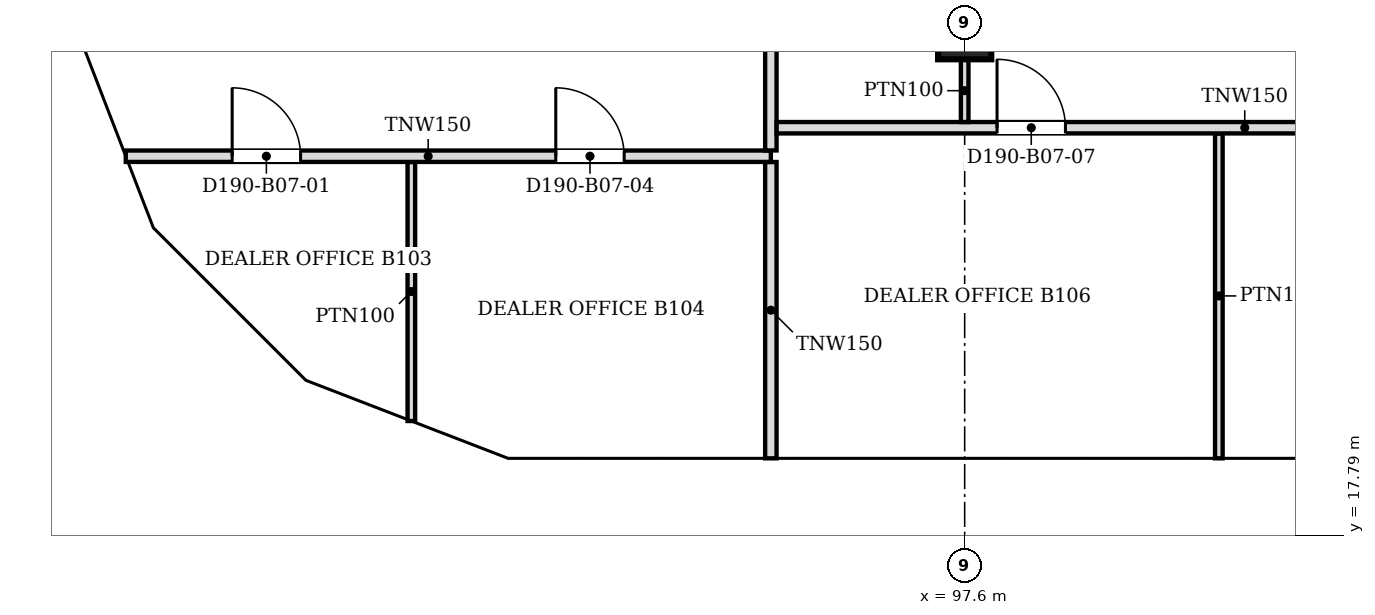
"""IFC4 building model, lengths in metres.
Left out: names, types, materials, properties, quantities, classifications, styles, units other than length and angle.
Written with IfcOpenShell. Run it as: python <this file> out.ifc"""

import sys

from ifc_helpers import new_model, si_unit, direction, frame, frame_2d, origin, origin_2d, place, context, subcontext, project, spatial, polyline, rectangle, outline, extrude, faceted_brep, source, transform, mapped, element, fill, save


model = new_model("IFC4")
c1 = context("Model", 3, precision=1e-05, world=origin(), true_north=direction((0.0, 1.0)))
c2 = subcontext(c1, "Body", "Model", "MODEL_VIEW")
j1 = project(units=[si_unit("LENGTHUNIT", "METRE"), si_unit("PLANEANGLEUNIT", "RADIAN")], contexts=[c1])
p1 = place(None, origin())
s1 = spatial("IfcSite", under=j1, at=p1, CompositionType="ELEMENT")
p2 = place(p1, origin())
s2 = spatial("IfcBuilding", under=s1, at=p2, CompositionType="ELEMENT")
p3 = place(p2, frame((0.0, 0.0, 72.4)))
s3 = spatial("IfcBuildingStorey", under=s2, at=p3, CompositionType="ELEMENT", Elevation=72.4)
p4 = place(p3, frame((97.6, 24.4, 0.0), z_axis=(0.0, 0.0, 1.0), x_axis=(1.0, 0.0, 0.0)))
e1 = element("IfcColumn", 1, at=p4, inside=s3, PredefinedType="COLUMN", context=c2, shape_type="SweptSolid", body=[
    extrude(rectangle(XDim=0.7, YDim=0.7, at=origin_2d()), origin(), (0.0, 0.0, 1.0), 3.6),
])
m1 = source(origin(), c2, "Body", "Brep", [
    faceted_brep([(3.003, -0.25, 0.0), (6.053, -0.25, 3.8), (3.003, -0.25, 7.6), (0.0, -0.25, 3.8), (0.047, 0.25, 3.859), (3.003, 0.25, 7.6), (6.053, 0.25, 3.8), (3.003, 0.25, 0.0), (0.047, 0.25, 3.741), (0.0, 0.0, 3.8)], [[[0, 1, 2, 3]], [[4, 5, 6, 7, 8]], [[7, 6, 1, 0]], [[6, 5, 2, 1]], [[5, 4, 9, 3, 2]], [[8, 7, 0, 3, 9]], [[8, 9, 4]]]),
])
p5 = place(p3, frame((91.547, 18.55, -3.8), z_axis=(0.0, 0.0, 1.0), x_axis=(1.0, 0.0, 0.0)))
e2 = element("IfcWall", 2, at=p5, inside=s3, PredefinedType="SOLIDWALL", context=c2, shape_type="MappedRepresentation", body=[
    mapped(m1, transform((0.0, 0.0, 0.0), scale=1.0)),
])
m2 = source(origin(), c2, "Body", "SweptSolid", [
    extrude(outline(polyline([(3.005, 0.401), (5.733, 3.8), (3.005, 7.199), (0.319, 3.8), (3.005, 0.401)])), frame((0.0, 0.26, 0.0), z_axis=(0.0, -1.0, 0.0), x_axis=(1.0, 0.0, 0.0)), (0.0, 0.0, 1.0), 0.52),
])
p6 = place(p5, origin())
e3 = element("IfcOpeningElement", 3, at=p6, cuts=e2, PredefinedType="OPENING", context=c2, shape_type="MappedRepresentation", body=[
    mapped(m2, transform((0.0, 0.0, 0.0), scale=1.0)),
])
m3 = source(origin(), c2, "Body", "Brep", [
    faceted_brep([(3.05, -0.25, 0.0), (6.1, -0.25, 3.8), (6.1, -0.25, 3.8), (3.05, -0.25, 7.6), (0.0, -0.25, 3.8), (0.0, 0.25, 3.8), (3.05, 0.25, 7.6), (6.1, 0.25, 3.8), (6.1, 0.25, 3.8), (3.05, 0.25, 0.0)], [[[0, 1, 2, 3, 4]], [[5, 6, 7, 8, 9]], [[9, 8, 1, 0]], [[7, 6, 3, 2]], [[6, 5, 4, 3]], [[5, 9, 0, 4]], [[1, 8, 7, 2]]]),
])
p7 = place(p3, frame((97.6, 18.55, -3.8), z_axis=(0.0, 0.0, 1.0), x_axis=(1.0, 0.0, 0.0)))
e4 = element("IfcWall", 4, at=p7, inside=s3, PredefinedType="SOLIDWALL", context=c2, shape_type="MappedRepresentation", body=[
    mapped(m3, transform((0.0, 0.0, 0.0), scale=1.0)),
])
m4 = source(origin(), c2, "Body", "SweptSolid", [
    extrude(outline(polyline([(3.05, 0.399), (5.78, 3.8), (3.05, 7.2), (0.321, 3.8), (3.05, 0.399)])), frame((0.0, 0.26, 0.0), z_axis=(0.0, -1.0, 0.0), x_axis=(1.0, 0.0, 0.0)), (0.0, 0.0, 1.0), 0.52),
])
p8 = place(p7, origin())
e5 = element("IfcOpeningElement", 5, at=p8, cuts=e4, PredefinedType="OPENING", context=c2, shape_type="MappedRepresentation", body=[
    mapped(m4, transform((0.0, 0.0, 0.0), scale=1.0)),
])
m5 = source(origin(), c2, "Body", "Brep", [
    faceted_brep([(0.047, -0.25, 0.0), (2.997, -0.25, 3.8), (0.047, -0.25, 7.6), (0.0, -0.25, 7.541), (0.0, -0.25, 0.059), (0.093, 0.25, 7.54), (2.944, 0.25, 3.868), (2.944, 0.25, 3.732), (0.093, 0.25, 0.06), (2.997, 0.0, 3.8), (0.047, 0.0, 0.0), (0.047, 0.0, 7.6)], [[[0, 1, 2, 3, 4]], [[5, 6, 7, 8]], [[8, 7, 9, 1, 0, 10]], [[6, 5, 11, 2, 1, 9]], [[3, 2, 11]], [[10, 0, 4]], [[8, 10, 4, 3, 11, 5]], [[9, 7, 6]]]),
])
p9 = place(p3, frame((85.633, 24.49, -3.8), z_axis=(0.0, 0.0, 1.0), x_axis=(0.359901446078, -0.932990326376, 0.0)))
e6 = element("IfcWall", 6, at=p9, inside=s3, PredefinedType="SOLIDWALL", context=c2, shape_type="MappedRepresentation", body=[
    mapped(m5, transform((0.0, 0.0, 0.0), scale=1.0)),
])
m6 = source(origin(), c2, "Body", "SweptSolid", [
    extrude(outline(polyline([(0.247, 0.665), (2.681, 3.8), (0.247, 6.935), (0.247, 0.665)])), frame((0.0, 0.26, 0.0), z_axis=(0.0, -1.0, 0.0), x_axis=(1.0, 0.0, 0.0)), (0.0, 0.0, 1.0), 0.52),
])
p10 = place(p9, origin())
e7 = element("IfcOpeningElement", 7, at=p10, cuts=e6, PredefinedType="OPENING", context=c2, shape_type="MappedRepresentation", body=[
    mapped(m6, transform((0.0, 0.0, 0.0), scale=1.0)),
])
m7 = source(origin(), c2, "Body", "Brep", [
    faceted_brep([(2.944, -0.25, 0.0), (2.997, -0.25, 0.068), (2.997, -0.25, 7.532), (2.944, -0.25, 7.6), (0.0, -0.25, 3.8), (0.053, 0.25, 3.868), (2.891, 0.25, 7.532), (2.891, 0.25, 0.068), (0.053, 0.25, 3.731), (2.944, 0.0, 0.0), (2.944, 0.0, 7.6), (0.0, 0.0, 3.8)], [[[0, 1, 2, 3, 4]], [[5, 6, 7, 8]], [[1, 0, 9]], [[10, 3, 2]], [[6, 5, 11, 4, 3, 10]], [[8, 7, 9, 0, 4, 11]], [[8, 11, 5]], [[1, 9, 7, 6, 10, 2]]]),
])
p11 = place(p3, frame((86.712, 21.694, -3.8), z_axis=(0.0, 0.0, 1.0), x_axis=(0.707066050402, -0.707147509625, 0.0)))
e8 = element("IfcWall", 8, at=p11, inside=s3, PredefinedType="SOLIDWALL", context=c2, shape_type="MappedRepresentation", body=[
    mapped(m7, transform((0.0, 0.0, 0.0), scale=1.0)),
])
m8 = source(origin(), c2, "Body", "SweptSolid", [
    extrude(outline(polyline([(2.744, 6.934), (0.316, 3.8), (2.744, 0.666), (2.744, 6.934)])), frame((0.0, 0.26, 0.0), z_axis=(0.0, -1.0, 0.0), x_axis=(1.0, 0.0, 0.0)), (0.0, 0.0, 1.0), 0.52),
])
p12 = place(p11, origin())
e9 = element("IfcOpeningElement", 9, at=p12, cuts=e8, PredefinedType="OPENING", context=c2, shape_type="MappedRepresentation", body=[
    mapped(m8, transform((0.0, 0.0, 0.0), scale=1.0)),
])
m9 = source(origin(), c2, "Body", "Brep", [
    faceted_brep([(0.053, -0.25, 0.0), (3.003, -0.25, 3.8), (0.053, -0.25, 7.6), (0.0, -0.25, 7.531), (0.0, -0.25, 0.068), (0.106, 0.25, 7.532), (2.957, 0.25, 3.86), (2.957, 0.25, 3.74), (0.106, 0.25, 0.068), (3.003, 0.0, 3.8), (0.053, 0.0, 0.0), (0.053, 0.0, 7.6)], [[[0, 1, 2, 3, 4]], [[5, 6, 7, 8]], [[8, 7, 9, 1, 0, 10]], [[6, 5, 11, 2, 1, 9]], [[3, 2, 11]], [[10, 0, 4]], [[8, 10, 4, 3, 11, 5]], [[9, 7, 6]]]),
])
p13 = place(p3, frame((88.744, 19.631, -3.8), z_axis=(0.0, 0.0, 1.0), x_axis=(0.932997369089, -0.359883188373, 0.0)))
e10 = element("IfcWall", 10, at=p13, inside=s3, PredefinedType="SOLIDWALL", context=c2, shape_type="MappedRepresentation", body=[
    mapped(m9, transform((0.0, 0.0, 0.0), scale=1.0)),
])
m10 = source(origin(), c2, "Body", "SweptSolid", [
    extrude(outline(polyline([(0.253, 0.665), (2.687, 3.8), (0.253, 6.935), (0.253, 0.665)])), frame((0.0, 0.26, 0.0), z_axis=(0.0, -1.0, 0.0), x_axis=(1.0, 0.0, 0.0)), (0.0, 0.0, 1.0), 0.52),
])
p14 = place(p13, origin())
e11 = element("IfcOpeningElement", 11, at=p14, cuts=e10, PredefinedType="OPENING", context=c2, shape_type="MappedRepresentation", body=[
    mapped(m10, transform((0.0, 0.0, 0.0), scale=1.0)),
])
p15 = place(p2, frame((0.0, 0.0, 76.2)))
s4 = spatial("IfcBuildingStorey", under=s2, at=p15, CompositionType="ELEMENT", Elevation=76.2)
m11 = source(origin(), c2, "Body", "Brep", [
    faceted_brep([(0.047, -0.25, 0.0), (3.05, -0.25, 3.8), (0.047, -0.25, 7.6), (0.0, -0.25, 7.54), (0.0, -0.25, 0.06), (0.093, 0.25, 7.541), (3.05, 0.25, 3.8), (0.093, 0.25, 0.059), (0.047, 0.0, 0.0), (0.047, 0.0, 7.6)], [[[0, 1, 2, 3, 4]], [[5, 6, 7]], [[7, 6, 1, 0, 8]], [[6, 5, 9, 2, 1]], [[3, 2, 9]], [[8, 0, 4]], [[7, 8, 4, 3, 9, 5]]]),
])
p16 = place(p15, frame((91.5, 18.55, -3.8), z_axis=(0.0, 0.0, 1.0), x_axis=(1.0, 0.0, 0.0)))
e12 = element("IfcWall", 12, at=p16, inside=s4, PredefinedType="SOLIDWALL", context=c2, shape_type="MappedRepresentation", body=[
    mapped(m11, transform((0.0, 0.0, 0.0), scale=1.0)),
])
m12 = source(origin(), c2, "Body", "SweptSolid", [
    extrude(outline(polyline([(0.247, 0.656), (2.731, 3.8), (0.247, 6.944), (0.247, 0.656)])), frame((0.0, 0.26, 0.0), z_axis=(0.0, -1.0, 0.0), x_axis=(1.0, 0.0, 0.0)), (0.0, 0.0, 1.0), 0.52),
])
p17 = place(p16, origin())
e13 = element("IfcOpeningElement", 13, at=p17, cuts=e12, PredefinedType="OPENING", context=c2, shape_type="MappedRepresentation", body=[
    mapped(m12, transform((0.0, 0.0, 0.0), scale=1.0)),
])
m13 = source(origin(), c2, "Body", "Brep", [
    faceted_brep([(2.95, -0.25, 0.0), (2.997, -0.25, 0.059), (2.997, -0.25, 7.541), (2.95, -0.25, 7.6), (0.0, -0.25, 3.8), (0.053, 0.25, 3.868), (2.904, 0.25, 7.54), (2.904, 0.25, 0.06), (0.053, 0.25, 3.732), (2.95, 0.0, 0.0), (2.95, 0.0, 7.6), (0.0, 0.0, 3.8)], [[[0, 1, 2, 3, 4]], [[5, 6, 7, 8]], [[1, 0, 9]], [[10, 3, 2]], [[6, 5, 11, 4, 3, 10]], [[8, 7, 9, 0, 4, 11]], [[8, 11, 5]], [[1, 9, 7, 6, 10, 2]]]),
])
p18 = place(p15, frame((88.794, 19.612, -3.8), z_axis=(0.0, 0.0, 1.0), x_axis=(0.933000876937, -0.359874094142, 0.0)))
e14 = element("IfcWall", 14, at=p18, inside=s4, PredefinedType="SOLIDWALL", context=c2, shape_type="MappedRepresentation", body=[
    mapped(m13, transform((0.0, 0.0, 0.0), scale=1.0)),
])
m14 = source(origin(), c2, "Body", "SweptSolid", [
    extrude(outline(polyline([(2.75, 6.935), (0.316, 3.8), (2.75, 0.665), (2.75, 6.935)])), frame((0.0, 0.26, 0.0), z_axis=(0.0, -1.0, 0.0), x_axis=(1.0, 0.0, 0.0)), (0.0, 0.0, 1.0), 0.52),
])
p19 = place(p18, origin())
e15 = element("IfcOpeningElement", 15, at=p19, cuts=e14, PredefinedType="OPENING", context=c2, shape_type="MappedRepresentation", body=[
    mapped(m14, transform((0.0, 0.0, 0.0), scale=1.0)),
])
m15 = source(origin(), c2, "Body", "Brep", [
    faceted_brep([(3.05, -0.25, 0.0), (6.1, -0.25, 3.8), (6.1, -0.25, 3.8), (3.05, -0.25, 7.6), (0.0, -0.25, 3.8), (0.0, 0.25, 3.8), (3.05, 0.25, 7.6), (6.1, 0.25, 3.8), (6.1, 0.25, 3.8), (3.05, 0.25, 0.0)], [[[0, 1, 2, 3, 4]], [[5, 6, 7, 8, 9]], [[9, 8, 1, 0]], [[7, 6, 3, 2]], [[6, 5, 4, 3]], [[5, 9, 0, 4]], [[1, 8, 7, 2]]]),
])
p20 = place(p15, frame((94.55, 18.55, -3.8), z_axis=(0.0, 0.0, 1.0), x_axis=(1.0, 0.0, 0.0)))
e16 = element("IfcWall", 16, at=p20, inside=s4, PredefinedType="SOLIDWALL", context=c2, shape_type="MappedRepresentation", body=[
    mapped(m15, transform((0.0, 0.0, 0.0), scale=1.0)),
])
m16 = source(origin(), c2, "Body", "SweptSolid", [
    extrude(outline(polyline([(3.05, 0.399), (5.78, 3.8), (3.05, 7.201), (0.321, 3.8), (3.05, 0.399)])), frame((0.0, 0.26, 0.0), z_axis=(0.0, -1.0, 0.0), x_axis=(1.0, 0.0, 0.0)), (0.0, 0.0, 1.0), 0.52),
])
p21 = place(p20, origin())
e17 = element("IfcOpeningElement", 17, at=p21, cuts=e16, PredefinedType="OPENING", context=c2, shape_type="MappedRepresentation", body=[
    mapped(m16, transform((0.0, 0.0, 0.0), scale=1.0)),
])
m17 = source(origin(), c2, "Body", "SweptSolid", [
    extrude(outline(polyline([(3.05, 0.0), (6.1, 3.8), (3.05, 7.6), (0.0, 3.8), (3.05, 0.0)])), frame((0.0, 0.25, 0.0), z_axis=(0.0, -1.0, 0.0), x_axis=(1.0, 0.0, 0.0)), (0.0, 0.0, 1.0), 0.5),
])
p22 = place(p15, frame((100.65, 18.55, -3.8), z_axis=(0.0, 0.0, 1.0), x_axis=(1.0, 0.0, 0.0)))
e18 = element("IfcWall", 18, at=p22, inside=s4, PredefinedType="SOLIDWALL", context=c2, shape_type="MappedRepresentation", body=[
    mapped(m17, transform((0.0, 0.0, 0.0), scale=1.0)),
])
p23 = place(p22, origin())
e19 = element("IfcOpeningElement", 19, at=p23, cuts=e18, PredefinedType="OPENING", context=c2, shape_type="MappedRepresentation", body=[
    mapped(m16, transform((0.0, 0.0, 0.0), scale=1.0)),
])
m18 = source(origin(), c2, "Body", "Brep", [
    faceted_brep([(2.95, -0.25, 0.0), (3.003, -0.25, 0.068), (3.003, -0.25, 7.532), (2.95, -0.25, 7.6), (0.0, -0.25, 3.8), (0.047, 0.25, 3.86), (2.898, 0.25, 7.532), (2.898, 0.25, 0.068), (0.047, 0.25, 3.74), (2.95, 0.0, 0.0), (2.95, 0.0, 7.6), (0.0, 0.0, 3.8)], [[[0, 1, 2, 3, 4]], [[5, 6, 7, 8]], [[1, 0, 9]], [[10, 3, 2]], [[6, 5, 11, 4, 3, 10]], [[8, 7, 9, 0, 4, 11]], [[8, 11, 5]], [[1, 9, 7, 6, 10, 2]]]),
])
p24 = place(p15, frame((85.65, 24.447, -3.8), z_axis=(0.0, 0.0, 1.0), x_axis=(0.35992665181, -0.932980602862, 0.0)))
e20 = element("IfcWall", 20, at=p24, inside=s4, PredefinedType="SOLIDWALL", context=c2, shape_type="MappedRepresentation", body=[
    mapped(m18, transform((0.0, 0.0, 0.0), scale=1.0)),
])
p25 = place(p24, origin())
e21 = element("IfcOpeningElement", 21, at=p25, cuts=e20, PredefinedType="OPENING", context=c2, shape_type="MappedRepresentation", body=[
    mapped(m14, transform((0.0, 0.0, 0.0), scale=1.0)),
])
m19 = source(origin(), c2, "Body", "Brep", [
    faceted_brep([(0.053, -0.25, 0.0), (2.997, -0.25, 3.8), (0.053, -0.25, 7.6), (0.0, -0.25, 7.532), (0.0, -0.25, 0.068), (0.106, 0.25, 7.532), (2.944, 0.25, 3.868), (2.944, 0.25, 3.732), (0.106, 0.25, 0.068), (2.997, 0.0, 3.8), (0.053, 0.0, 0.0), (0.053, 0.0, 7.6)], [[[0, 1, 2, 3, 4]], [[5, 6, 7, 8]], [[8, 7, 9, 1, 0, 10]], [[6, 5, 11, 2, 1, 9]], [[3, 2, 11]], [[10, 0, 4]], [[8, 10, 4, 3, 11, 5]], [[9, 7, 6]]]),
])
p26 = place(p15, frame((86.675, 21.731, -3.8), z_axis=(0.0, 0.0, 1.0), x_axis=(0.707106781187, -0.707106781187, 0.0)))
e22 = element("IfcWall", 22, at=p26, inside=s4, PredefinedType="SOLIDWALL", context=c2, shape_type="MappedRepresentation", body=[
    mapped(m19, transform((0.0, 0.0, 0.0), scale=1.0)),
])
m20 = source(origin(), c2, "Body", "SweptSolid", [
    extrude(outline(polyline([(0.253, 0.667), (2.681, 3.8), (0.253, 6.934), (0.253, 0.667)])), frame((0.0, 0.26, 0.0), z_axis=(0.0, -1.0, 0.0), x_axis=(1.0, 0.0, 0.0)), (0.0, 0.0, 1.0), 0.52),
])
p27 = place(p26, origin())
e23 = element("IfcOpeningElement", 23, at=p27, cuts=e22, PredefinedType="OPENING", context=c2, shape_type="MappedRepresentation", body=[
    mapped(m20, transform((0.0, 0.0, 0.0), scale=1.0)),
])
p28 = place(p3, frame((95.05, 18.8, 0.0), z_axis=(0.0, 0.0, 1.0), x_axis=(0.0, 1.0, 0.0)))
e24 = element("IfcWall", 24, at=p28, inside=s3, PredefinedType="PARTITIONING", context=c2, shape_type="SweptSolid", body=[
    extrude(rectangle(XDim=3.899, YDim=0.15, at=frame_2d((1.949, 0.0))), origin(), (0.0, 0.0, 1.0), 3.067),
])
p29 = place(p3, frame((100.944, 18.8, 0.0), z_axis=(0.0, 0.0, 1.0), x_axis=(0.0, 1.0, 0.0)))
e25 = element("IfcWall", 25, at=p29, inside=s3, PredefinedType="PARTITIONING", context=c2, shape_type="SweptSolid", body=[
    extrude(rectangle(XDim=4.274, YDim=0.1, at=frame_2d((2.137, 0.0))), origin(), (0.0, 0.0, 1.0), 3.067),
])
p30 = place(p3, frame((90.32, 19.291, 0.0), z_axis=(0.0, 0.0, 1.0), x_axis=(0.0, 1.0, 0.0)))
e26 = element("IfcWall", 26, at=p30, inside=s3, PredefinedType="PARTITIONING", context=c2, shape_type="SweptSolid", body=[
    extrude(rectangle(XDim=3.408, YDim=0.1, at=frame_2d((1.704, 0.0))), origin(), (0.0, 0.0, 1.0), 3.067),
])
p31 = place(p3, frame((95.05, 22.775, 0.0), z_axis=(0.0, 0.0, 1.0), x_axis=(-1.0, 0.0, 0.0)))
e27 = element("IfcWall", 27, at=p31, inside=s3, PredefinedType="PARTITIONING", context=c2, shape_type="SweptSolid", body=[
    extrude(rectangle(XDim=8.487, YDim=0.15, at=frame_2d((4.244, 0.0))), origin(), (0.0, 0.0, 1.0), 3.067),
])
m21 = source(origin(), c2, "Body", "SweptSolid", [
    extrude(rectangle(XDim=0.9, YDim=2.1, at=frame_2d((0.45, 1.05))), frame((0.0, 0.085, 0.0), z_axis=(0.0, -1.0, 0.0), x_axis=(1.0, 0.0, 0.0)), (0.0, 0.0, 1.0), 0.17),
])
p32 = place(p31, frame((6.187, 0.0, 0.0)))
e28 = element("IfcOpeningElement", 28, at=p32, cuts=e27, PredefinedType="OPENING", context=c2, shape_type="MappedRepresentation", body=[
    mapped(m21, transform((0.0, 0.0, 0.0), scale=1.0)),
])
p33 = place(p31, frame((1.93, 0.0, 0.0)))
e29 = element("IfcOpeningElement", 29, at=p33, cuts=e27, PredefinedType="OPENING", context=c2, shape_type="MappedRepresentation", body=[
    mapped(m21, transform((0.0, 0.0, 0.0), scale=1.0)),
])
p34 = place(p3, frame((95.05, 22.851, 0.0), z_axis=(0.0, 0.0, 1.0), x_axis=(0.0, 1.0, 0.0)))
e30 = element("IfcWall", 30, at=p34, inside=s3, PredefinedType="PARTITIONING", context=c2, shape_type="SweptSolid", body=[
    extrude(rectangle(XDim=10.873, YDim=0.15, at=frame_2d((5.437, 0.0))), origin(), (0.0, 0.0, 1.0), 3.067),
])
p35 = place(p3, frame((107.25, 23.15, 0.0), z_axis=(0.0, 0.0, 1.0), x_axis=(-1.0, 0.0, 0.0)))
e31 = element("IfcWall", 31, at=p35, inside=s3, PredefinedType="PARTITIONING", context=c2, shape_type="SweptSolid", body=[
    extrude(rectangle(XDim=12.124, YDim=0.15, at=frame_2d((6.062, 0.0))), origin(), (0.0, 0.0, 1.0), 3.067),
])
p36 = place(p35, frame((8.324, 0.0, 0.0)))
e32 = element("IfcOpeningElement", 32, at=p36, cuts=e31, PredefinedType="OPENING", context=c2, shape_type="MappedRepresentation", body=[
    mapped(m21, transform((0.0, 0.0, 0.0), scale=1.0)),
])
p37 = place(p35, frame((2.706, 0.0, 0.0)))
e33 = element("IfcOpeningElement", 33, at=p37, cuts=e31, PredefinedType="OPENING", context=c2, shape_type="MappedRepresentation", body=[
    mapped(m21, transform((0.0, 0.0, 0.0), scale=1.0)),
])
p38 = place(p3, frame((97.6, 24.05, 0.0), z_axis=(0.0, 0.0, 1.0), x_axis=(0.0, -1.0, 0.0)))
e34 = element("IfcWall", 34, at=p38, inside=s3, PredefinedType="PARTITIONING", context=c2, shape_type="SweptSolid", body=[
    extrude(rectangle(XDim=0.825, YDim=0.1, at=frame_2d((0.413, 0.0))), origin(), (0.0, 0.0, 1.0), 3.067),
])
m22 = source(origin(), c2, "Body", "SweptSolid", [
    extrude(rectangle(XDim=0.9, YDim=2.1, at=frame_2d((0.45, 1.05))), frame((0.0, 0.025, 0.0), z_axis=(0.0, -1.0, 0.0), x_axis=(1.0, 0.0, 0.0)), (0.0, 0.0, 1.0), 0.05),
])
p39 = place(p32, origin())
e35 = element("IfcDoor", 35, at=p39, inside=s3, OperationType="SINGLE_SWING_RIGHT", PredefinedType="DOOR", context=c2, shape_type="MappedRepresentation", body=[
    mapped(m22, transform((0.0, 0.0, 0.0), scale=1.0)),
])
fill(e28, e35)
p40 = place(p33, origin())
e36 = element("IfcDoor", 36, at=p40, inside=s3, OperationType="SINGLE_SWING_RIGHT", PredefinedType="DOOR", context=c2, shape_type="MappedRepresentation", body=[
    mapped(m22, transform((0.0, 0.0, 0.0), scale=1.0)),
])
fill(e29, e36)
p41 = place(p36, origin())
e37 = element("IfcDoor", 37, at=p41, inside=s3, OperationType="SINGLE_SWING_RIGHT", PredefinedType="DOOR", context=c2, shape_type="MappedRepresentation", body=[
    mapped(m22, transform((0.0, 0.0, 0.0), scale=1.0)),
])
fill(e32, e37)
save(model, sys.argv[1])
